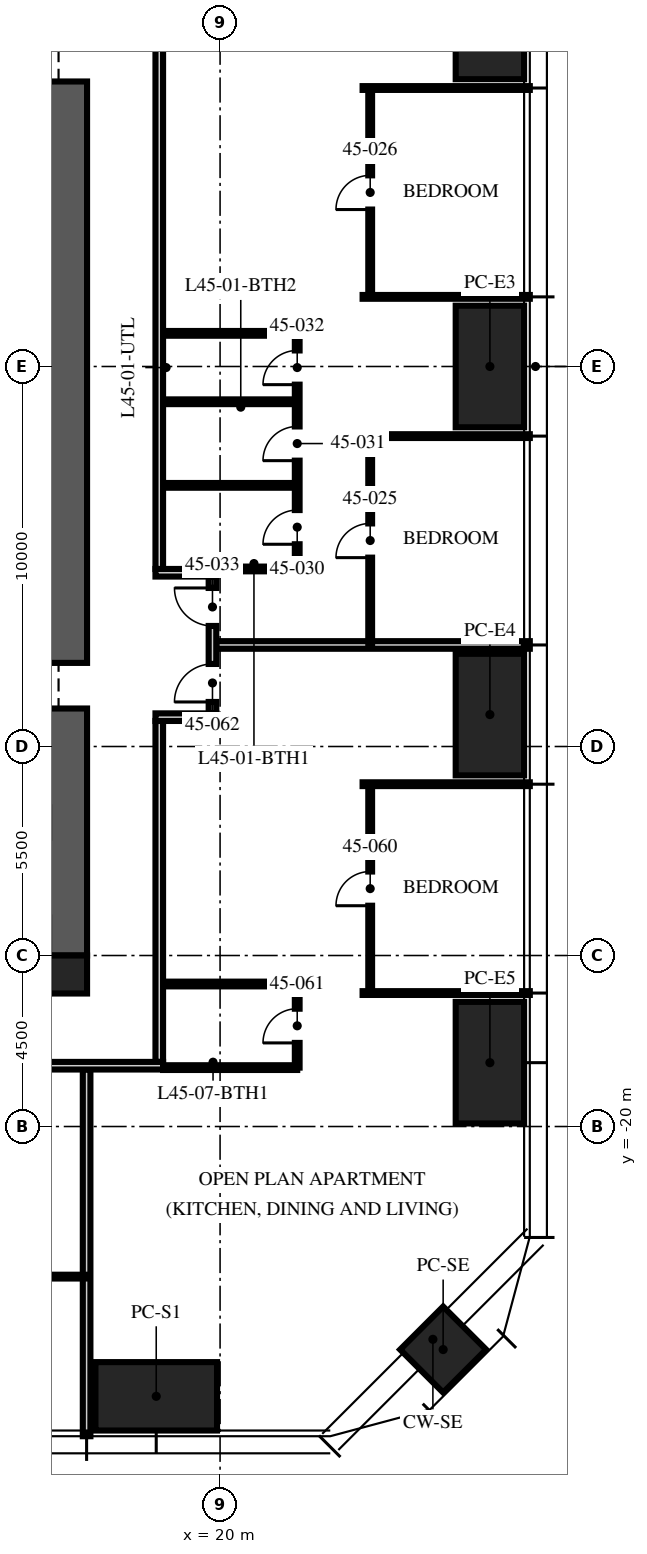
"""IFC4 building model, lengths in metres.
Left out: names, types, materials, properties, quantities, classifications, styles, units other than length and angle.
Written with IfcOpenShell. Run it as: python <this file> out.ifc"""

import sys

from ifc_helpers import new_model, si_unit, direction, frame, frame_2d, origin, origin_2d, place, context, subcontext, project, spatial, rectangle, hollow_rectangle, extrude, element, fill, save


model = new_model("IFC4")
c1 = context("Model", 3, precision=1e-05, world=origin(), true_north=direction((0.0, 1.0)))
c2 = subcontext(c1, "Body", "Model", "MODEL_VIEW")
j1 = project(units=[si_unit("LENGTHUNIT", "METRE"), si_unit("PLANEANGLEUNIT", "RADIAN")], contexts=[c1])
p1 = place(None, origin())
s1 = spatial("IfcSite", under=j1, at=p1, CompositionType="ELEMENT")
p2 = place(p1, origin())
s2 = spatial("IfcBuilding", under=s1, at=p2, CompositionType="ELEMENT")
p3 = place(p2, frame((0.0, 0.0, 178.5)))
s3 = spatial("IfcBuildingStorey", under=s2, at=p3, CompositionType="ELEMENT", Elevation=178.5)
p4 = place(p3, frame((15.5, -15.5, -0.25), z_axis=(0.0, 0.0, 1.0), x_axis=(0.0, 1.0, 0.0)))
e1 = element("IfcWall", 1, at=p4, inside=s3, PredefinedType="SHEAR", context=c2, shape_type="SweptSolid", body=[
    extrude(rectangle(XDim=31.0, YDim=2.0, at=frame_2d((15.5, 0.0))), origin(), (0.0, 0.0, 1.0), 3.75),
])
p5 = place(p4, frame((6.5, 0.0, 0.25)))
e2 = element("IfcOpeningElement", 2, at=p5, cuts=e1, PredefinedType="OPENING", context=c2, shape_type="SweptSolid", body=[
    extrude(rectangle(XDim=1.2, YDim=2.1, at=frame_2d((0.6, 1.05))), frame((0.0, 1.01, 0.0), z_axis=(0.0, -1.0, 0.0), x_axis=(1.0, 0.0, 0.0)), (0.0, 0.0, 1.0), 2.02),
])
p6 = place(p4, frame((23.0, 0.0, 0.25)))
e3 = element("IfcOpeningElement", 3, at=p6, cuts=e1, PredefinedType="OPENING", context=c2, shape_type="SweptSolid", body=[
    extrude(rectangle(XDim=1.8, YDim=2.1, at=frame_2d((0.9, 1.05))), frame((0.0, 1.01, 0.0), z_axis=(0.0, -1.0, 0.0), x_axis=(1.0, 0.0, 0.0)), (0.0, 0.0, 1.0), 2.02),
])
p7 = place(p3, frame((16.0, -16.0, -0.25), z_axis=(0.0, 0.0, 1.0), x_axis=(1.0, 0.0, 0.0)))
e4 = element("IfcColumn", 4, at=p7, inside=s3, PredefinedType="COLUMN", context=c2, shape_type="SweptSolid", body=[
    extrude(rectangle(XDim=1.0, YDim=1.0, at=origin_2d()), origin(), (0.0, 0.0, 1.0), 3.75),
])
for number, where, z_axis, x_axis in (
    (5, (27.1, 9.16, 0.0), (0.0, 0.0, 1.0), (0.0, 1.0, 0.0)),
    (6, (27.1, 0.0, 0.0), (0.0, 0.0, 1.0), (0.0, 1.0, 0.0)),
    (7, (27.1, -9.16, 0.0), (0.0, 0.0, 1.0), (0.0, 1.0, 0.0)),
    (8, (27.1, -18.32, 0.0), (0.0, 0.0, 1.0), (0.0, 1.0, 0.0)),
    (9, (18.32, -27.1, 0.0), (0.0, 0.0, 1.0), (1.0, 0.0, 0.0)),
):
    element("IfcColumn", number, at=place(p3, frame(where, z_axis=z_axis, x_axis=x_axis)), inside=s3, PredefinedType="COLUMN", context=c2, shape_type="SweptSolid", body=[
        extrude(hollow_rectangle(XDim=3.2, YDim=1.8, WallThickness=0.2, at=origin_2d()), origin(), (0.0, 0.0, 1.0), 3.75),
    ])
p8 = place(p3, frame((25.87, -25.87, 0.0), z_axis=(0.0, 0.0, 1.0), x_axis=(0.707106781187, 0.707106781187, 0.0)))
e10 = element("IfcColumn", 10, at=p8, inside=s3, PredefinedType="COLUMN", context=c2, shape_type="SweptSolid", body=[
    extrude(hollow_rectangle(XDim=1.6, YDim=1.6, WallThickness=0.1, at=origin_2d()), origin(), (0.0, 0.0, 1.0), 3.75),
])
p9 = place(p3, frame((19.9, -7.328, 0.0), z_axis=(0.0, 0.0, 1.0), x_axis=(1.0, 0.0, 0.0)))
e11 = element("IfcWall", 11, at=p9, inside=s3, PredefinedType="PARTITIONING", context=c2, shape_type="SweptSolid", body=[
    extrude(rectangle(XDim=8.25, YDim=0.2, at=frame_2d((4.125, 0.0))), origin(), (0.0, 0.0, 1.0), 2.81),
])
for number, where, z_axis, x_axis in (
    (12, (23.75, -1.832, 0.0), (0.0, 0.0, 1.0), (1.0, 0.0, 0.0)),
    (13, (23.75, 1.832, 0.0), (0.0, 0.0, 1.0), (1.0, 0.0, 0.0)),
    (14, (23.75, 7.328, 0.0), (0.0, 0.0, 1.0), (1.0, 0.0, 0.0)),
):
    element("IfcWall", number, at=place(p3, frame(where, z_axis=z_axis, x_axis=x_axis)), inside=s3, PredefinedType="PARTITIONING", context=c2, shape_type="SweptSolid", body=[
        extrude(rectangle(XDim=4.4, YDim=0.1, at=frame_2d((2.2, 0.0))), origin(), (0.0, 0.0, 1.0), 2.81),
    ])
p10 = place(p3, frame((16.488, -18.5, 0.0), z_axis=(0.0, 0.0, 1.0), x_axis=(0.0, -1.0, 0.0)))
e15 = element("IfcWall", 15, at=p10, inside=s3, PredefinedType="PARTITIONING", context=c2, shape_type="SweptSolid", body=[
    extrude(rectangle(XDim=9.65, YDim=0.2, at=frame_2d((4.825, 0.0))), origin(), (0.0, 0.0, 1.0), 2.81),
])
for number, where, z_axis, x_axis in (
    (16, (23.75, -16.488, 0.0), (0.0, 0.0, 1.0), (1.0, 0.0, 0.0)),
    (17, (23.75, -10.992, 0.0), (0.0, 0.0, 1.0), (1.0, 0.0, 0.0)),
):
    element("IfcWall", number, at=place(p3, frame(where, z_axis=z_axis, x_axis=x_axis)), inside=s3, PredefinedType="PARTITIONING", context=c2, shape_type="SweptSolid", body=[
        extrude(rectangle(XDim=4.4, YDim=0.1, at=frame_2d((2.2, 0.0))), origin(), (0.0, 0.0, 1.0), 2.81),
    ])
p11 = place(p3, frame((23.95, -7.328, 0.0), z_axis=(0.0, 0.0, 1.0), x_axis=(0.0, 1.0, 0.0)))
e18 = element("IfcWall", 18, at=p11, inside=s3, PredefinedType="PARTITIONING", context=c2, shape_type="SweptSolid", body=[
    extrude(rectangle(XDim=5.496, YDim=0.1, at=frame_2d((2.748, 0.0))), origin(), (0.0, 0.0, 1.0), 2.81),
])
p12 = place(p11, frame((2.298, 0.0, 0.0)))
e19 = element("IfcOpeningElement", 19, at=p12, cuts=e18, PredefinedType="OPENING", context=c2, shape_type="SweptSolid", body=[
    extrude(rectangle(XDim=0.9, YDim=2.1, at=frame_2d((0.45, 1.05))), frame((0.0, 0.06, 0.0), z_axis=(0.0, -1.0, 0.0), x_axis=(1.0, 0.0, 0.0)), (0.0, 0.0, 1.0), 0.12),
])
p13 = place(p3, frame((23.95, 1.832, 0.0), z_axis=(0.0, 0.0, 1.0), x_axis=(0.0, 1.0, 0.0)))
e20 = element("IfcWall", 20, at=p13, inside=s3, PredefinedType="PARTITIONING", context=c2, shape_type="SweptSolid", body=[
    extrude(rectangle(XDim=5.496, YDim=0.1, at=frame_2d((2.748, 0.0))), origin(), (0.0, 0.0, 1.0), 2.81),
])
p14 = place(p13, frame((2.298, 0.0, 0.0)))
e21 = element("IfcOpeningElement", 21, at=p14, cuts=e20, PredefinedType="OPENING", context=c2, shape_type="SweptSolid", body=[
    extrude(rectangle(XDim=0.9, YDim=2.1, at=frame_2d((0.45, 1.05))), frame((0.0, 0.06, 0.0), z_axis=(0.0, -1.0, 0.0), x_axis=(1.0, 0.0, 0.0)), (0.0, 0.0, 1.0), 0.12),
])
p15 = place(p3, frame((22.03, -5.328, 0.0), z_axis=(0.0, 0.0, 1.0), x_axis=(0.0, 1.0, 0.0)))
e22 = element("IfcWall", 22, at=p15, inside=s3, PredefinedType="PARTITIONING", context=c2, shape_type="SweptSolid", body=[
    extrude(rectangle(XDim=6.2, YDim=0.125, at=frame_2d((3.1, 0.0))), origin(), (0.0, 0.0, 1.0), 2.7),
])
p16 = place(p15, frame((0.65, 0.0, 0.0)))
e23 = element("IfcOpeningElement", 23, at=p16, cuts=e22, PredefinedType="OPENING", context=c2, shape_type="SweptSolid", body=[
    extrude(rectangle(XDim=0.9, YDim=2.1, at=frame_2d((0.45, 1.05))), frame((0.0, 0.073, 0.0), z_axis=(0.0, -1.0, 0.0), x_axis=(1.0, 0.0, 0.0)), (0.0, 0.0, 1.0), 0.145),
])
p17 = place(p15, frame((2.85, 0.0, 0.0)))
e24 = element("IfcOpeningElement", 24, at=p17, cuts=e22, PredefinedType="OPENING", context=c2, shape_type="SweptSolid", body=[
    extrude(rectangle(XDim=0.9, YDim=2.1, at=frame_2d((0.45, 1.05))), frame((0.0, 0.073, 0.0), z_axis=(0.0, -1.0, 0.0), x_axis=(1.0, 0.0, 0.0)), (0.0, 0.0, 1.0), 0.145),
])
p18 = place(p15, frame((4.85, 0.0, 0.0)))
e25 = element("IfcOpeningElement", 25, at=p18, cuts=e22, PredefinedType="OPENING", context=c2, shape_type="SweptSolid", body=[
    extrude(rectangle(XDim=0.9, YDim=2.1, at=frame_2d((0.45, 1.05))), frame((0.0, 0.073, 0.0), z_axis=(0.0, -1.0, 0.0), x_axis=(1.0, 0.0, 0.0)), (0.0, 0.0, 1.0), 0.145),
])
p19 = place(p3, frame((19.97, -5.328, 0.0), z_axis=(0.0, 0.0, 1.0), x_axis=(1.0, 0.0, 0.0)))
e26 = element("IfcWall", 26, at=p19, inside=s3, PredefinedType="PARTITIONING", context=c2, shape_type="SweptSolid", body=[
    extrude(rectangle(XDim=2.06, YDim=0.125, at=frame_2d((1.03, 0.0))), origin(), (0.0, 0.0, 1.0), 3.5),
])
for number, where, z_axis, x_axis in (
    (27, (18.5, -3.128, 0.0), (0.0, 0.0, 1.0), (1.0, 0.0, 0.0)),
    (28, (18.5, -0.928, 0.0), (0.0, 0.0, 1.0), (1.0, 0.0, 0.0)),
    (29, (18.5, 0.872, 0.0), (0.0, 0.0, 1.0), (1.0, 0.0, 0.0)),
):
    element("IfcWall", number, at=place(p3, frame(where, z_axis=z_axis, x_axis=x_axis)), inside=s3, PredefinedType="PARTITIONING", context=c2, shape_type="SweptSolid", body=[
        extrude(rectangle(XDim=3.53, YDim=0.125, at=frame_2d((1.765, 0.0))), origin(), (0.0, 0.0, 1.0), 3.5),
    ])
p20 = place(p3, frame((10.992, -23.95, 0.0), z_axis=(0.0, 0.0, 1.0), x_axis=(1.0, 0.0, 0.0)))
e30 = element("IfcWall", 30, at=p20, inside=s3, PredefinedType="PARTITIONING", context=c2, shape_type="SweptSolid", body=[
    extrude(rectangle(XDim=5.496, YDim=0.1, at=frame_2d((2.748, 0.0))), origin(), (0.0, 0.0, 1.0), 2.81),
])
p21 = place(p20, frame((2.298, 0.0, 0.0)))
e31 = element("IfcOpeningElement", 31, at=p21, cuts=e30, PredefinedType="OPENING", context=c2, shape_type="SweptSolid", body=[
    extrude(rectangle(XDim=0.9, YDim=2.1, at=frame_2d((0.45, 1.05))), frame((0.0, 0.06, 0.0), z_axis=(0.0, -1.0, 0.0), x_axis=(1.0, 0.0, 0.0)), (0.0, 0.0, 1.0), 0.12),
])
p22 = place(p3, frame((23.95, -16.488, 0.0), z_axis=(0.0, 0.0, 1.0), x_axis=(0.0, 1.0, 0.0)))
e32 = element("IfcWall", 32, at=p22, inside=s3, PredefinedType="PARTITIONING", context=c2, shape_type="SweptSolid", body=[
    extrude(rectangle(XDim=5.496, YDim=0.1, at=frame_2d((2.748, 0.0))), origin(), (0.0, 0.0, 1.0), 2.81),
])
p23 = place(p22, frame((2.298, 0.0, 0.0)))
e33 = element("IfcOpeningElement", 33, at=p23, cuts=e32, PredefinedType="OPENING", context=c2, shape_type="SweptSolid", body=[
    extrude(rectangle(XDim=0.9, YDim=2.1, at=frame_2d((0.45, 1.05))), frame((0.0, 0.06, 0.0), z_axis=(0.0, -1.0, 0.0), x_axis=(1.0, 0.0, 0.0)), (0.0, 0.0, 1.0), 0.12),
])
p24 = place(p3, frame((22.03, -18.45, 0.0), z_axis=(0.0, 0.0, 1.0), x_axis=(0.0, 1.0, 0.0)))
e34 = element("IfcWall", 34, at=p24, inside=s3, PredefinedType="PARTITIONING", context=c2, shape_type="SweptSolid", body=[
    extrude(rectangle(XDim=2.2, YDim=0.125, at=frame_2d((1.1, 0.0))), origin(), (0.0, 0.0, 1.0), 2.7),
])
p25 = place(p24, frame((0.65, 0.0, 0.0)))
e35 = element("IfcOpeningElement", 35, at=p25, cuts=e34, PredefinedType="OPENING", context=c2, shape_type="SweptSolid", body=[
    extrude(rectangle(XDim=0.9, YDim=2.1, at=frame_2d((0.45, 1.05))), frame((0.0, 0.073, 0.0), z_axis=(0.0, -1.0, 0.0), x_axis=(1.0, 0.0, 0.0)), (0.0, 0.0, 1.0), 0.145),
])
p26 = place(p3, frame((18.5, -18.45, 0.0), z_axis=(0.0, 0.0, 1.0), x_axis=(1.0, 0.0, 0.0)))
e36 = element("IfcWall", 36, at=p26, inside=s3, PredefinedType="PARTITIONING", context=c2, shape_type="SweptSolid", body=[
    extrude(rectangle(XDim=3.53, YDim=0.125, at=frame_2d((1.765, 0.0))), origin(), (0.0, 0.0, 1.0), 2.3),
])
p27 = place(p3, frame((18.5, -16.25, 0.0), z_axis=(0.0, 0.0, 1.0), x_axis=(1.0, 0.0, 0.0)))
e37 = element("IfcWall", 37, at=p27, inside=s3, PredefinedType="PARTITIONING", context=c2, shape_type="SweptSolid", body=[
    extrude(rectangle(XDim=3.53, YDim=0.125, at=frame_2d((1.765, 0.0))), origin(), (0.0, 0.0, 1.0), 3.5),
])
p28 = place(p3, frame((18.4, -18.3, 0.0), z_axis=(0.0, 0.0, 1.0), x_axis=(0.0, 1.0, 0.0)))
e38 = element("IfcWall", 38, at=p28, inside=s3, PredefinedType="PARTITIONING", context=c2, shape_type="SweptSolid", body=[
    extrude(rectangle(XDim=8.972, YDim=0.2, at=frame_2d((4.486, 0.0))), origin(), (0.0, 0.0, 1.0), 2.3),
])
p29 = place(p3, frame((18.3, -9.228, 0.0), z_axis=(0.0, 0.0, 1.0), x_axis=(1.0, 0.0, 0.0)))
e39 = element("IfcWall", 39, at=p29, inside=s3, PredefinedType="PARTITIONING", context=c2, shape_type="SweptSolid", body=[
    extrude(rectangle(XDim=1.6, YDim=0.2, at=frame_2d((0.8, 0.0))), origin(), (0.0, 0.0, 1.0), 2.7),
])
p30 = place(p3, frame((18.3, -5.428, 0.0), z_axis=(0.0, 0.0, 1.0), x_axis=(1.0, 0.0, 0.0)))
e40 = element("IfcWall", 40, at=p30, inside=s3, PredefinedType="PARTITIONING", context=c2, shape_type="SweptSolid", body=[
    extrude(rectangle(XDim=1.6, YDim=0.2, at=frame_2d((0.8, 0.0))), origin(), (0.0, 0.0, 1.0), 3.5),
])
p31 = place(p3, frame((19.8, -9.128, 0.0), z_axis=(0.0, 0.0, 1.0), x_axis=(0.0, 1.0, 0.0)))
e41 = element("IfcWall", 41, at=p31, inside=s3, PredefinedType="PARTITIONING", context=c2, shape_type="SweptSolid", body=[
    extrude(rectangle(XDim=3.6, YDim=0.2, at=frame_2d((1.8, 0.0))), origin(), (0.0, 0.0, 1.0), 2.7),
])
p32 = place(p31, frame((2.3, 0.0, 0.0)))
e42 = element("IfcOpeningElement", 42, at=p32, cuts=e41, PredefinedType="OPENING", context=c2, shape_type="SweptSolid", body=[
    extrude(rectangle(XDim=1.0, YDim=2.2, at=frame_2d((0.5, 1.1))), frame((0.0, 0.11, 0.0), z_axis=(0.0, -1.0, 0.0), x_axis=(1.0, 0.0, 0.0)), (0.0, 0.0, 1.0), 0.22),
])
p33 = place(p31, frame((0.3, 0.0, 0.0)))
e43 = element("IfcOpeningElement", 43, at=p33, cuts=e41, PredefinedType="OPENING", context=c2, shape_type="SweptSolid", body=[
    extrude(rectangle(XDim=1.0, YDim=2.2, at=frame_2d((0.5, 1.1))), frame((0.0, 0.11, 0.0), z_axis=(0.0, -1.0, 0.0), x_axis=(1.0, 0.0, 0.0)), (0.0, 0.0, 1.0), 0.22),
])
p34 = place(p3, frame((18.4, -5.328, 0.0), z_axis=(0.0, 0.0, 1.0), x_axis=(0.0, 1.0, 0.0)))
e44 = element("IfcWall", 44, at=p34, inside=s3, PredefinedType="PARTITIONING", context=c2, shape_type="SweptSolid", body=[
    extrude(rectangle(XDim=22.028, YDim=0.2, at=frame_2d((11.014, 0.0))), origin(), (0.0, 0.0, 1.0), 2.7),
])
p35 = place(p3, frame((18.5, -18.4, 0.0), z_axis=(0.0, 0.0, 1.0), x_axis=(-1.0, 0.0, 0.0)))
e45 = element("IfcWall", 45, at=p35, inside=s3, PredefinedType="PARTITIONING", context=c2, shape_type="SweptSolid", body=[
    extrude(rectangle(XDim=12.9, YDim=0.2, at=frame_2d((6.45, 0.0))), origin(), (0.0, 0.0, 1.0), 2.3),
])
p36 = place(p12, origin())
e46 = element("IfcDoor", 46, at=p36, inside=s3, OperationType="SINGLE_SWING_LEFT", PredefinedType="DOOR", context=c2, shape_type="SweptSolid", body=[
    extrude(rectangle(XDim=0.9, YDim=2.1, at=frame_2d((0.45, 1.05))), frame((0.0, 0.025, 0.0), z_axis=(0.0, -1.0, 0.0), x_axis=(1.0, 0.0, 0.0)), (0.0, 0.0, 1.0), 0.05),
])
fill(e19, e46)
p37 = place(p14, origin())
e47 = element("IfcDoor", 47, at=p37, inside=s3, OperationType="SINGLE_SWING_LEFT", PredefinedType="DOOR", context=c2, shape_type="SweptSolid", body=[
    extrude(rectangle(XDim=0.9, YDim=2.1, at=frame_2d((0.45, 1.05))), frame((0.0, 0.025, 0.0), z_axis=(0.0, -1.0, 0.0), x_axis=(1.0, 0.0, 0.0)), (0.0, 0.0, 1.0), 0.05),
])
fill(e21, e47)
p38 = place(p16, origin())
e48 = element("IfcDoor", 48, at=p38, inside=s3, OperationType="SINGLE_SWING_LEFT", PredefinedType="DOOR", context=c2, shape_type="SweptSolid", body=[
    extrude(rectangle(XDim=0.9, YDim=2.1, at=frame_2d((0.45, 1.05))), frame((0.0, 0.025, 0.0), z_axis=(0.0, -1.0, 0.0), x_axis=(1.0, 0.0, 0.0)), (0.0, 0.0, 1.0), 0.05),
])
fill(e23, e48)
p39 = place(p17, origin())
e49 = element("IfcDoor", 49, at=p39, inside=s3, OperationType="SINGLE_SWING_LEFT", PredefinedType="DOOR", context=c2, shape_type="SweptSolid", body=[
    extrude(rectangle(XDim=0.9, YDim=2.1, at=frame_2d((0.45, 1.05))), frame((0.0, 0.025, 0.0), z_axis=(0.0, -1.0, 0.0), x_axis=(1.0, 0.0, 0.0)), (0.0, 0.0, 1.0), 0.05),
])
fill(e24, e49)
p40 = place(p18, origin())
e50 = element("IfcDoor", 50, at=p40, inside=s3, OperationType="SINGLE_SWING_LEFT", PredefinedType="DOOR", context=c2, shape_type="SweptSolid", body=[
    extrude(rectangle(XDim=0.9, YDim=2.1, at=frame_2d((0.45, 1.05))), frame((0.0, 0.025, 0.0), z_axis=(0.0, -1.0, 0.0), x_axis=(1.0, 0.0, 0.0)), (0.0, 0.0, 1.0), 0.05),
])
fill(e25, e50)
p41 = place(p32, origin())
e51 = element("IfcDoor", 51, at=p41, inside=s3, OperationType="SINGLE_SWING_RIGHT", PredefinedType="DOOR", context=c2, shape_type="SweptSolid", body=[
    extrude(rectangle(XDim=1.0, YDim=2.2, at=frame_2d((0.5, 1.1))), frame((0.0, 0.025, 0.0), z_axis=(0.0, -1.0, 0.0), x_axis=(1.0, 0.0, 0.0)), (0.0, 0.0, 1.0), 0.05),
])
fill(e42, e51)
p42 = place(p23, origin())
e52 = element("IfcDoor", 52, at=p42, inside=s3, OperationType="SINGLE_SWING_LEFT", PredefinedType="DOOR", context=c2, shape_type="SweptSolid", body=[
    extrude(rectangle(XDim=0.9, YDim=2.1, at=frame_2d((0.45, 1.05))), frame((0.0, 0.025, 0.0), z_axis=(0.0, -1.0, 0.0), x_axis=(1.0, 0.0, 0.0)), (0.0, 0.0, 1.0), 0.05),
])
fill(e33, e52)
p43 = place(p25, origin())
e53 = element("IfcDoor", 53, at=p43, inside=s3, OperationType="SINGLE_SWING_LEFT", PredefinedType="DOOR", context=c2, shape_type="SweptSolid", body=[
    extrude(rectangle(XDim=0.9, YDim=2.1, at=frame_2d((0.45, 1.05))), frame((0.0, 0.025, 0.0), z_axis=(0.0, -1.0, 0.0), x_axis=(1.0, 0.0, 0.0)), (0.0, 0.0, 1.0), 0.05),
])
fill(e35, e53)
p44 = place(p33, origin())
e54 = element("IfcDoor", 54, at=p44, inside=s3, OperationType="SINGLE_SWING_LEFT", PredefinedType="DOOR", context=c2, shape_type="SweptSolid", body=[
    extrude(rectangle(XDim=1.0, YDim=2.2, at=frame_2d((0.5, 1.1))), frame((0.0, 0.025, 0.0), z_axis=(0.0, -1.0, 0.0), x_axis=(1.0, 0.0, 0.0)), (0.0, 0.0, 1.0), 0.05),
])
fill(e43, e54)
save(model, sys.argv[1])
